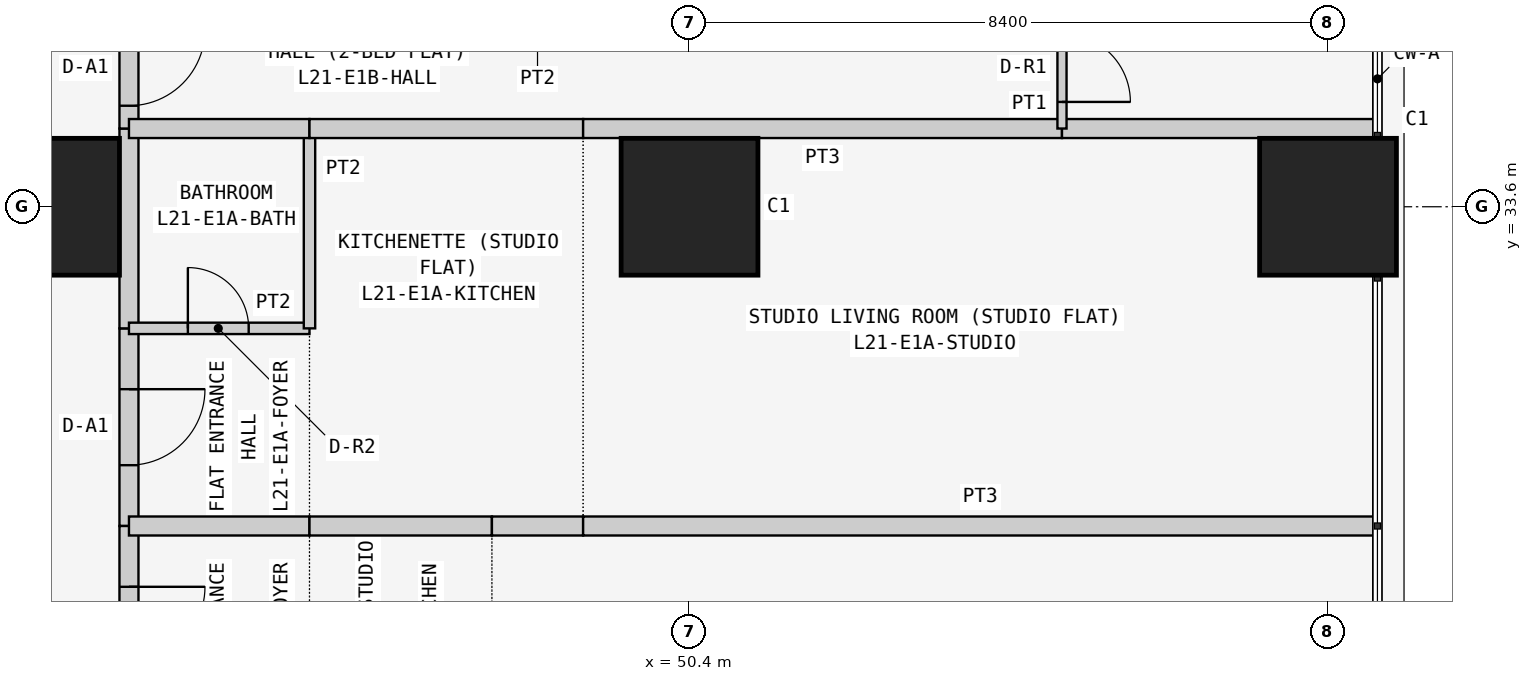
"""IFC4 building model, lengths in metres.
Left out: names, types, materials, properties, quantities, classifications, styles, units other than length and angle.
Written with IfcOpenShell. Run it as: python <this file> out.ifc"""

import sys

from ifc_helpers import new_model, si_unit, direction, frame, frame_2d, origin, origin_2d, place, context, subcontext, project, spatial, rectangle, extrude, element, fill, save


model = new_model("IFC4")
c1 = context("Model", 3, precision=1e-05, world=origin(), true_north=direction((0.0, 1.0)))
c2 = subcontext(c1, "Body", "Model", "MODEL_VIEW")
j1 = project(units=[si_unit("LENGTHUNIT", "METRE"), si_unit("PLANEANGLEUNIT", "RADIAN")], contexts=[c1])
p1 = place(None, origin())
s1 = spatial("IfcSite", under=j1, at=p1, CompositionType="ELEMENT")
p2 = place(p1, origin())
s2 = spatial("IfcBuilding", under=s1, at=p2, CompositionType="ELEMENT")
p3 = place(p2, frame((0.0, 0.0, 84.9)))
s3 = spatial("IfcBuildingStorey", under=s2, at=p3, CompositionType="ELEMENT", Elevation=84.9)
for number, where, z_axis, x_axis in (
    (1, (42.0, 33.6, 0.0), (0.0, 0.0, 1.0), (1.0, 0.0, 0.0)),
    (2, (50.4, 33.6, 0.0), (0.0, 0.0, 1.0), (1.0, 0.0, 0.0)),
    (3, (58.8, 33.6, 0.0), (0.0, 0.0, 1.0), (1.0, 0.0, 0.0)),
):
    element("IfcColumn", number, at=place(p3, frame(where, z_axis=z_axis, x_axis=x_axis)), inside=s3, PredefinedType="COLUMN", context=c2, shape_type="SweptSolid", body=[
        extrude(rectangle(XDim=1.8, YDim=1.8, at=origin_2d()), origin(), (0.0, 0.0, 1.0), 3.6),
    ])
p4 = place(p3, frame((43.025, 32.0, 0.0), z_axis=(0.0, 0.0, 1.0), x_axis=(0.0, -1.0, 0.0)))
e4 = element("IfcWall", 4, at=p4, inside=s3, PredefinedType="PARTITIONING", context=c2, shape_type="SweptSolid", body=[
    extrude(rectangle(XDim=2.6, YDim=0.25, at=frame_2d((1.3, 0.0))), origin(), (0.0, 0.0, 1.0), 3.45),
])
p5 = place(p4, frame((0.8, 0.0, 0.0)))
e5 = element("IfcOpeningElement", 5, at=p5, cuts=e4, PredefinedType="OPENING", context=c2, shape_type="SweptSolid", body=[
    extrude(rectangle(XDim=1.0, YDim=2.1, at=frame_2d((0.5, 1.05))), frame((0.0, 0.135, 0.0), z_axis=(0.0, -1.0, 0.0), x_axis=(1.0, 0.0, 0.0)), (0.0, 0.0, 1.0), 0.27),
])
p6 = place(p3, frame((43.025, 34.629, 0.0), z_axis=(0.0, 0.0, 1.0), x_axis=(0.0, -1.0, 0.0)))
e6 = element("IfcWall", 6, at=p6, inside=s3, PredefinedType="PARTITIONING", context=c2, shape_type="SweptSolid", body=[
    extrude(rectangle(XDim=2.629, YDim=0.25, at=frame_2d((1.314, 0.0))), origin(), (0.0, 0.0, 1.0), 3.45),
])
p7 = place(p3, frame((43.025, 36.229, 0.0), z_axis=(0.0, 0.0, 1.0), x_axis=(0.0, -1.0, 0.0)))
e7 = element("IfcWall", 7, at=p7, inside=s3, PredefinedType="PARTITIONING", context=c2, shape_type="SweptSolid", body=[
    extrude(rectangle(XDim=1.6, YDim=0.25, at=frame_2d((0.8, 0.0))), origin(), (0.0, 0.0, 1.0), 3.45),
])
p8 = place(p7, frame((0.3, 0.0, 0.0)))
e8 = element("IfcOpeningElement", 8, at=p8, cuts=e7, PredefinedType="OPENING", context=c2, shape_type="SweptSolid", body=[
    extrude(rectangle(XDim=1.0, YDim=2.1, at=frame_2d((0.5, 1.05))), frame((0.0, 0.135, 0.0), z_axis=(0.0, -1.0, 0.0), x_axis=(1.0, 0.0, 0.0)), (0.0, 0.0, 1.0), 0.27),
])
p9 = place(p3, frame((43.025, 29.4, 0.0), z_axis=(0.0, 0.0, 1.0), x_axis=(0.0, -1.0, 0.0)))
e9 = element("IfcWall", 9, at=p9, inside=s3, PredefinedType="PARTITIONING", context=c2, shape_type="SweptSolid", body=[
    extrude(rectangle(XDim=2.6, YDim=0.25, at=frame_2d((1.3, 0.0))), origin(), (0.0, 0.0, 1.0), 3.45),
])
p10 = place(p9, frame((0.8, 0.0, 0.0)))
e10 = element("IfcOpeningElement", 10, at=p10, cuts=e9, PredefinedType="OPENING", context=c2, shape_type="SweptSolid", body=[
    extrude(rectangle(XDim=1.0, YDim=2.1, at=frame_2d((0.5, 1.05))), frame((0.0, 0.135, 0.0), z_axis=(0.0, -1.0, 0.0), x_axis=(1.0, 0.0, 0.0)), (0.0, 0.0, 1.0), 0.27),
])
p11 = place(p3, frame((45.4, 32.0, 0.0), z_axis=(0.0, 0.0, 1.0), x_axis=(-1.0, 0.0, 0.0)))
e11 = element("IfcWall", 11, at=p11, inside=s3, PredefinedType="PARTITIONING", context=c2, shape_type="SweptSolid", body=[
    extrude(rectangle(XDim=2.375, YDim=0.15, at=frame_2d((1.188, 0.0))), origin(), (0.0, 0.0, 1.0), 3.45),
])
p12 = place(p11, frame((0.8, 0.0, 0.0)))
e12 = element("IfcOpeningElement", 12, at=p12, cuts=e11, PredefinedType="OPENING", context=c2, shape_type="SweptSolid", body=[
    extrude(rectangle(XDim=0.8, YDim=2.1, at=frame_2d((0.4, 1.05))), frame((0.0, 0.085, 0.0), z_axis=(0.0, -1.0, 0.0), x_axis=(1.0, 0.0, 0.0)), (0.0, 0.0, 1.0), 0.17),
])
p13 = place(p3, frame((43.025, 29.4, 0.0), z_axis=(0.0, 0.0, 1.0), x_axis=(1.0, 0.0, 0.0)))
e13 = element("IfcWall", 13, at=p13, inside=s3, PredefinedType="PARTITIONING", context=c2, shape_type="SweptSolid", body=[
    extrude(rectangle(XDim=2.375, YDim=0.25, at=frame_2d((1.188, 0.0))), origin(), (0.0, 0.0, 1.0), 3.45),
])
p14 = place(p3, frame((45.4, 32.0, 0.0), z_axis=(0.0, 0.0, 1.0), x_axis=(0.0, 1.0, 0.0)))
e14 = element("IfcWall", 14, at=p14, inside=s3, PredefinedType="PARTITIONING", context=c2, shape_type="SweptSolid", body=[
    extrude(rectangle(XDim=2.629, YDim=0.15, at=frame_2d((1.314, 0.0))), origin(), (0.0, 0.0, 1.0), 3.45),
])
p15 = place(p3, frame((45.4, 34.629, 0.0), z_axis=(0.0, 0.0, 1.0), x_axis=(-1.0, 0.0, 0.0)))
e15 = element("IfcWall", 15, at=p15, inside=s3, PredefinedType="PARTITIONING", context=c2, shape_type="SweptSolid", body=[
    extrude(rectangle(XDim=2.375, YDim=0.25, at=frame_2d((1.188, 0.0))), origin(), (0.0, 0.0, 1.0), 3.45),
])
p16 = place(p3, frame((49.0, 34.629, 0.0), z_axis=(0.0, 0.0, 1.0), x_axis=(-1.0, 0.0, 0.0)))
e16 = element("IfcWall", 16, at=p16, inside=s3, PredefinedType="PARTITIONING", context=c2, shape_type="SweptSolid", body=[
    extrude(rectangle(XDim=3.6, YDim=0.25, at=frame_2d((1.8, 0.0))), origin(), (0.0, 0.0, 1.0), 3.45),
])
p17 = place(p3, frame((45.4, 29.4, 0.0), z_axis=(0.0, 0.0, 1.0), x_axis=(1.0, 0.0, 0.0)))
e17 = element("IfcWall", 17, at=p17, inside=s3, PredefinedType="PARTITIONING", context=c2, shape_type="SweptSolid", body=[
    extrude(rectangle(XDim=2.4, YDim=0.25, at=frame_2d((1.2, 0.0))), origin(), (0.0, 0.0, 1.0), 3.45),
])
p18 = place(p3, frame((47.8, 29.4, 0.0), z_axis=(0.0, 0.0, 1.0), x_axis=(1.0, 0.0, 0.0)))
e18 = element("IfcWall", 18, at=p18, inside=s3, PredefinedType="PARTITIONING", context=c2, shape_type="SweptSolid", body=[
    extrude(rectangle(XDim=1.2, YDim=0.25, at=frame_2d((0.6, 0.0))), origin(), (0.0, 0.0, 1.0), 3.45),
])
p19 = place(p3, frame((55.3, 34.629, 0.0), z_axis=(0.0, 0.0, 1.0), x_axis=(-1.0, 0.0, 0.0)))
e19 = element("IfcWall", 19, at=p19, inside=s3, PredefinedType="PARTITIONING", context=c2, shape_type="SweptSolid", body=[
    extrude(rectangle(XDim=6.3, YDim=0.25, at=frame_2d((3.15, 0.0))), origin(), (0.0, 0.0, 1.0), 3.45),
])
p20 = place(p3, frame((59.45, 34.629, 0.0), z_axis=(0.0, 0.0, 1.0), x_axis=(-1.0, 0.0, 0.0)))
e20 = element("IfcWall", 20, at=p20, inside=s3, PredefinedType="PARTITIONING", context=c2, shape_type="SweptSolid", body=[
    extrude(rectangle(XDim=4.15, YDim=0.25, at=frame_2d((2.075, 0.0))), origin(), (0.0, 0.0, 1.0), 3.45),
])
p21 = place(p3, frame((49.0, 29.4, 0.0), z_axis=(0.0, 0.0, 1.0), x_axis=(1.0, 0.0, 0.0)))
e21 = element("IfcWall", 21, at=p21, inside=s3, PredefinedType="PARTITIONING", context=c2, shape_type="SweptSolid", body=[
    extrude(rectangle(XDim=10.45, YDim=0.25, at=frame_2d((5.225, 0.0))), origin(), (0.0, 0.0, 1.0), 3.45),
])
p22 = place(p3, frame((55.3, 34.629, 0.0), z_axis=(0.0, 0.0, 1.0), x_axis=(0.0, 1.0, 0.0)))
e22 = element("IfcWall", 22, at=p22, inside=s3, PredefinedType="PARTITIONING", context=c2, shape_type="SweptSolid", body=[
    extrude(rectangle(XDim=1.6, YDim=0.12, at=frame_2d((0.8, 0.0))), origin(), (0.0, 0.0, 1.0), 3.45),
])
p23 = place(p22, frame((0.35, 0.0, 0.0)))
e23 = element("IfcOpeningElement", 23, at=p23, cuts=e22, PredefinedType="OPENING", context=c2, shape_type="SweptSolid", body=[
    extrude(rectangle(XDim=0.9, YDim=2.1, at=frame_2d((0.45, 1.05))), frame((0.0, 0.07, 0.0), z_axis=(0.0, -1.0, 0.0), x_axis=(1.0, 0.0, 0.0)), (0.0, 0.0, 1.0), 0.14),
])
p24 = place(p5, origin())
e24 = element("IfcDoor", 24, at=p24, inside=s3, OperationType="SINGLE_SWING_LEFT", PredefinedType="DOOR", context=c2, shape_type="SweptSolid", body=[
    extrude(rectangle(XDim=1.0, YDim=2.1, at=frame_2d((0.5, 1.05))), frame((0.0, 0.025, 0.0), z_axis=(0.0, -1.0, 0.0), x_axis=(1.0, 0.0, 0.0)), (0.0, 0.0, 1.0), 0.05),
])
fill(e5, e24)
p25 = place(p12, frame((0.8, 0.0, 0.0), z_axis=(0.0, 0.0, 1.0), x_axis=(-1.0, 0.0, 0.0)))
e25 = element("IfcDoor", 25, at=p25, inside=s3, OperationType="SINGLE_SWING_LEFT", PredefinedType="DOOR", context=c2, shape_type="SweptSolid", body=[
    extrude(rectangle(XDim=0.8, YDim=2.1, at=frame_2d((0.4, 1.05))), frame((0.0, 0.025, 0.0), z_axis=(0.0, -1.0, 0.0), x_axis=(1.0, 0.0, 0.0)), (0.0, 0.0, 1.0), 0.05),
])
fill(e12, e25)
p26 = place(p8, origin())
e26 = element("IfcDoor", 26, at=p26, inside=s3, OperationType="SINGLE_SWING_LEFT", PredefinedType="DOOR", context=c2, shape_type="SweptSolid", body=[
    extrude(rectangle(XDim=1.0, YDim=2.1, at=frame_2d((0.5, 1.05))), frame((0.0, 0.025, 0.0), z_axis=(0.0, -1.0, 0.0), x_axis=(1.0, 0.0, 0.0)), (0.0, 0.0, 1.0), 0.05),
])
fill(e8, e26)
p27 = place(p23, frame((0.9, 0.0, 0.0), z_axis=(0.0, 0.0, 1.0), x_axis=(-1.0, 0.0, 0.0)))
e27 = element("IfcDoor", 27, at=p27, inside=s3, OperationType="SINGLE_SWING_RIGHT", PredefinedType="DOOR", context=c2, shape_type="SweptSolid", body=[
    extrude(rectangle(XDim=0.9, YDim=2.1, at=frame_2d((0.45, 1.05))), frame((0.0, 0.025, 0.0), z_axis=(0.0, -1.0, 0.0), x_axis=(1.0, 0.0, 0.0)), (0.0, 0.0, 1.0), 0.05),
])
fill(e23, e27)
p28 = place(p10, origin())
e28 = element("IfcDoor", 28, at=p28, inside=s3, OperationType="SINGLE_SWING_LEFT", PredefinedType="DOOR", context=c2, shape_type="SweptSolid", body=[
    extrude(rectangle(XDim=1.0, YDim=2.1, at=frame_2d((0.5, 1.05))), frame((0.0, 0.025, 0.0), z_axis=(0.0, -1.0, 0.0), x_axis=(1.0, 0.0, 0.0)), (0.0, 0.0, 1.0), 0.05),
])
fill(e10, e28)
save(model, sys.argv[1])
